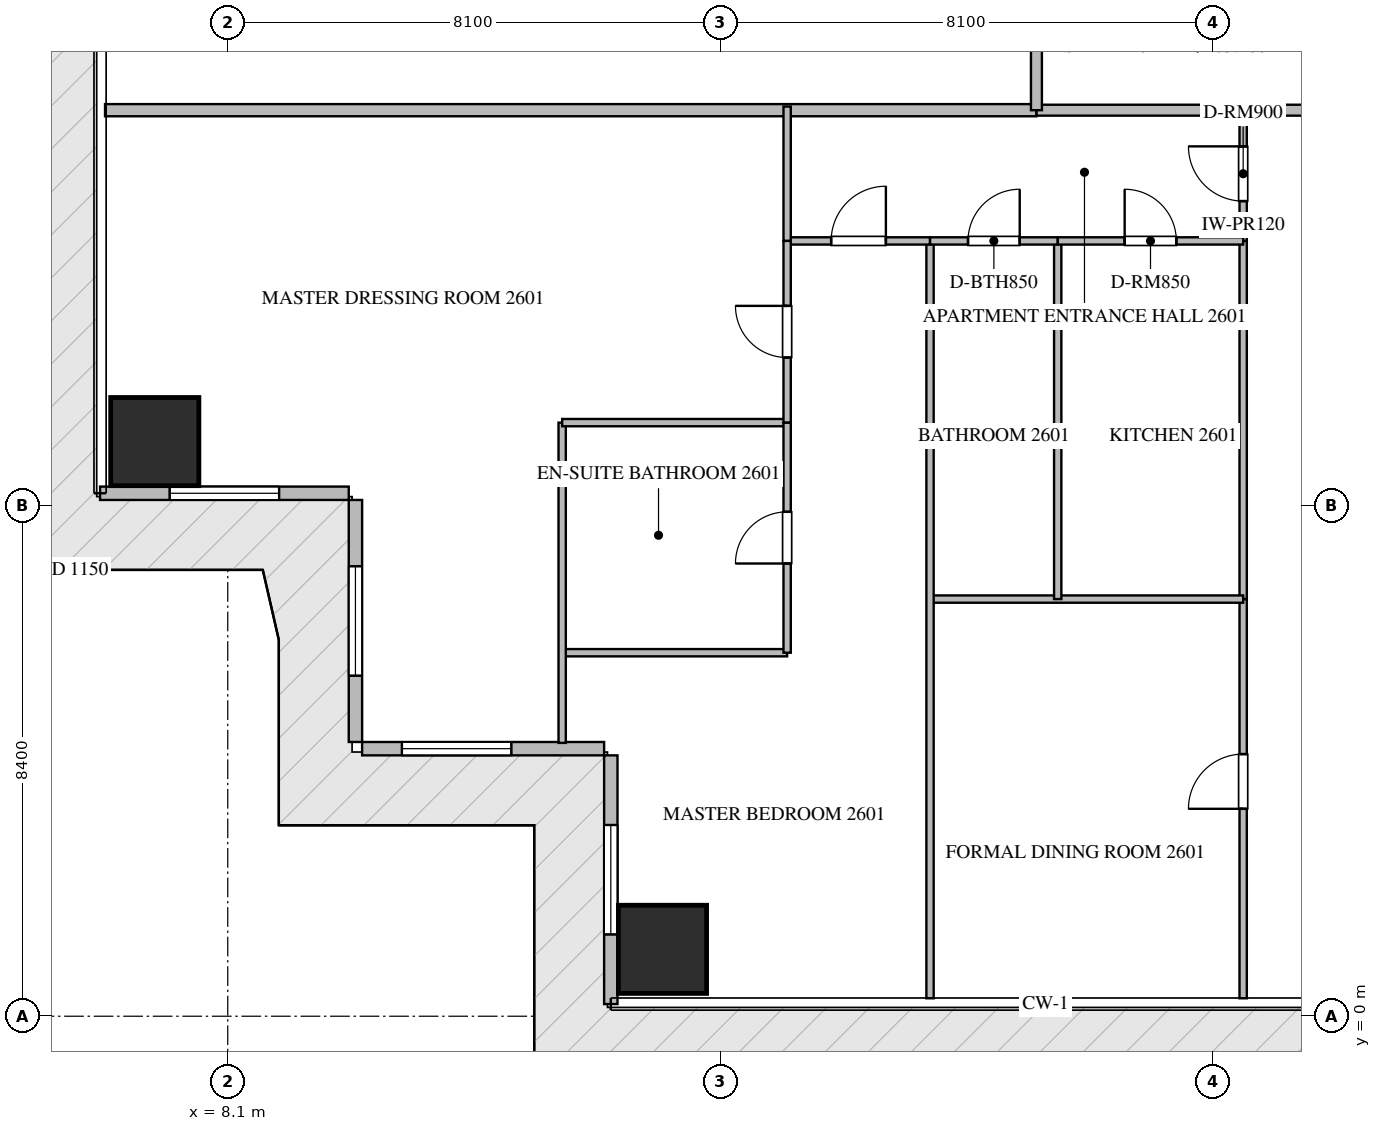
"""IFC4 building model, lengths in metres.
Left out: names, types, materials, properties, quantities, classifications, styles, units other than length and angle.
Written with IfcOpenShell. Run it as: python <this file> out.ifc"""

import sys

from ifc_helpers import new_model, si_unit, direction, frame, frame_2d, origin, origin_2d, place, context, subcontext, project, spatial, rectangle, extrude, source, transform, mapped, element, fill, save


model = new_model("IFC4")
c1 = context("Model", 3, precision=1e-05, world=origin(), true_north=direction((0.0, 1.0)))
c2 = subcontext(c1, "Body", "Model", "MODEL_VIEW")
j1 = project(units=[si_unit("LENGTHUNIT", "METRE"), si_unit("PLANEANGLEUNIT", "RADIAN")], contexts=[c1])
p1 = place(None, origin())
s1 = spatial("IfcSite", under=j1, at=p1, CompositionType="ELEMENT")
p2 = place(p1, origin())
s2 = spatial("IfcBuilding", under=s1, at=p2, CompositionType="ELEMENT")
p3 = place(p2, frame((0.0, 0.0, 105.45)))
s3 = spatial("IfcBuildingStorey", under=s2, at=p3, CompositionType="ELEMENT", Elevation=105.45)
m1 = source(origin(), c2, "Body", "SweptSolid", [
    extrude(rectangle(XDim=1.45, YDim=1.45, at=origin_2d()), origin(), (0.0, 0.0, 1.0), 3.65),
])
for number, where, z_axis, x_axis in (
    (1, (15.25, 1.1, -0.26), (0.0, 0.0, 1.0), (1.0, 0.0, 0.0)),
    (2, (6.9, 9.45, -0.26), (0.0, 0.0, 1.0), (1.0, 0.0, 0.0)),
):
    element("IfcColumn", number, at=place(p3, frame(where, z_axis=z_axis, x_axis=x_axis)), inside=s3, PredefinedType="COLUMN", context=c2, shape_type="MappedRepresentation", body=[
        mapped(m1, transform((0.0, 0.0, 0.0), scale=1.0)),
    ])
p4 = place(p3, frame((6.0, 8.6, 0.0), z_axis=(0.0, 0.0, 1.0), x_axis=(1.0, 0.0, 0.0)))
e3 = element("IfcWall", 3, at=p4, inside=s3, PredefinedType="ELEMENTEDWALL", context=c2, shape_type="SweptSolid", body=[
    extrude(rectangle(XDim=4.09, YDim=0.22, at=frame_2d((2.045, 0.0))), origin(), (0.0, 0.0, 1.0), 3.375),
])
p5 = place(p4, frame((1.145, 0.0, 0.65)))
e4 = element("IfcOpeningElement", 4, at=p5, cuts=e3, PredefinedType="OPENING", context=c2, shape_type="SweptSolid", body=[
    extrude(rectangle(XDim=1.8, YDim=2.1, at=frame_2d((0.9, 1.05))), frame((0.0, 0.12, 0.0), z_axis=(0.0, -1.0, 0.0), x_axis=(1.0, 0.0, 0.0)), (0.0, 0.0, 1.0), 0.24),
])
p6 = place(p3, frame((10.2, 8.49, 0.0), z_axis=(0.0, 0.0, 1.0), x_axis=(0.0, -1.0, 0.0)))
e5 = element("IfcWall", 5, at=p6, inside=s3, PredefinedType="ELEMENTEDWALL", context=c2, shape_type="SweptSolid", body=[
    extrude(rectangle(XDim=3.98, YDim=0.22, at=frame_2d((1.99, 0.0))), origin(), (0.0, 0.0, 1.0), 3.375),
])
p7 = place(p6, frame((1.09, 0.0, 0.65)))
e6 = element("IfcOpeningElement", 6, at=p7, cuts=e5, PredefinedType="OPENING", context=c2, shape_type="SweptSolid", body=[
    extrude(rectangle(XDim=1.8, YDim=2.1, at=frame_2d((0.9, 1.05))), frame((0.0, 0.12, 0.0), z_axis=(0.0, -1.0, 0.0), x_axis=(1.0, 0.0, 0.0)), (0.0, 0.0, 1.0), 0.24),
])
p8 = place(p3, frame((10.31, 4.4, 0.0), z_axis=(0.0, 0.0, 1.0), x_axis=(1.0, 0.0, 0.0)))
e7 = element("IfcWall", 7, at=p8, inside=s3, PredefinedType="ELEMENTEDWALL", context=c2, shape_type="SweptSolid", body=[
    extrude(rectangle(XDim=3.98, YDim=0.22, at=frame_2d((1.99, 0.0))), origin(), (0.0, 0.0, 1.0), 3.375),
])
p9 = place(p8, frame((0.654, 0.0, 0.65)))
e8 = element("IfcOpeningElement", 8, at=p9, cuts=e7, PredefinedType="OPENING", context=c2, shape_type="SweptSolid", body=[
    extrude(rectangle(XDim=1.8, YDim=2.1, at=frame_2d((0.9, 1.05))), frame((0.0, 0.12, 0.0), z_axis=(0.0, -1.0, 0.0), x_axis=(1.0, 0.0, 0.0)), (0.0, 0.0, 1.0), 0.24),
])
p10 = place(p3, frame((14.4, 4.29, 0.0), z_axis=(0.0, 0.0, 1.0), x_axis=(0.0, -1.0, 0.0)))
e9 = element("IfcWall", 9, at=p10, inside=s3, PredefinedType="ELEMENTEDWALL", context=c2, shape_type="SweptSolid", body=[
    extrude(rectangle(XDim=4.09, YDim=0.22, at=frame_2d((2.045, 0.0))), origin(), (0.0, 0.0, 1.0), 3.375),
])
p11 = place(p10, frame((1.145, 0.0, 0.65)))
e10 = element("IfcOpeningElement", 10, at=p11, cuts=e9, PredefinedType="OPENING", context=c2, shape_type="SweptSolid", body=[
    extrude(rectangle(XDim=1.8, YDim=2.1, at=frame_2d((0.9, 1.05))), frame((0.0, 0.12, 0.0), z_axis=(0.0, -1.0, 0.0), x_axis=(1.0, 0.0, 0.0)), (0.0, 0.0, 1.0), 0.24),
])
p12 = place(p3, frame((6.082, 14.9, 0.0), z_axis=(0.0, 0.0, 1.0), x_axis=(1.0, 0.0, 0.0)))
e11 = element("IfcWall", 11, at=p12, inside=s3, PredefinedType="PARTITIONING", context=c2, shape_type="SweptSolid", body=[
    extrude(rectangle(XDim=15.318, YDim=0.2, at=frame_2d((7.659, 0.0))), origin(), (0.0, 0.0, 1.0), 3.39),
])
p13 = place(p3, frame((21.402, 14.9, 0.0), z_axis=(0.0, 0.0, 1.0), x_axis=(1.0, 0.0, 0.0)))
e12 = element("IfcWall", 12, at=p13, inside=s3, PredefinedType="PARTITIONING", context=c2, shape_type="SweptSolid", body=[
    extrude(rectangle(XDim=21.996, YDim=0.18, at=frame_2d((10.998, 0.0))), origin(), (0.0, 0.0, 1.0), 3.39),
])
p14 = place(p13, frame((7.202, 0.0, 0.0)))
e13 = element("IfcOpeningElement", 13, at=p14, cuts=e12, PredefinedType="OPENING", context=c2, shape_type="SweptSolid", body=[
    extrude(rectangle(XDim=1.0, YDim=2.15, at=frame_2d((0.5, 1.075))), frame((0.0, 0.1, 0.0), z_axis=(0.0, -1.0, 0.0), x_axis=(1.0, 0.0, 0.0)), (0.0, 0.0, 1.0), 0.2),
])
p15 = place(p3, frame((21.4, 14.9, 0.0), z_axis=(0.0, 0.0, 1.0), x_axis=(0.0, 1.0, 0.0)))
e14 = element("IfcWall", 14, at=p15, inside=s3, PredefinedType="PARTITIONING", context=c2, shape_type="SweptSolid", body=[
    extrude(rectangle(XDim=20.6, YDim=0.18, at=frame_2d((10.3, 0.0))), origin(), (0.0, 0.0, 1.0), 3.39),
])
p16 = place(p15, frame((1.82, 0.0, 0.0)))
e15 = element("IfcOpeningElement", 15, at=p16, cuts=e14, PredefinedType="OPENING", context=c2, shape_type="SweptSolid", body=[
    extrude(rectangle(XDim=1.0, YDim=2.15, at=frame_2d((0.5, 1.075))), frame((0.0, 0.1, 0.0), z_axis=(0.0, -1.0, 0.0), x_axis=(1.0, 0.0, 0.0)), (0.0, 0.0, 1.0), 0.2),
])
p17 = place(p15, frame((11.27, 0.0, 0.0)))
e16 = element("IfcOpeningElement", 16, at=p17, cuts=e14, PredefinedType="OPENING", context=c2, shape_type="SweptSolid", body=[
    extrude(rectangle(XDim=1.0, YDim=2.15, at=frame_2d((0.5, 1.075))), frame((0.0, 0.1, 0.0), z_axis=(0.0, -1.0, 0.0), x_axis=(1.0, 0.0, 0.0)), (0.0, 0.0, 1.0), 0.2),
])
p18 = place(p15, frame((17.92, 0.0, 0.0)))
e17 = element("IfcOpeningElement", 17, at=p18, cuts=e14, PredefinedType="OPENING", context=c2, shape_type="SweptSolid", body=[
    extrude(rectangle(XDim=1.0, YDim=2.15, at=frame_2d((0.5, 1.075))), frame((0.0, 0.1, 0.0), z_axis=(0.0, -1.0, 0.0), x_axis=(1.0, 0.0, 0.0)), (0.0, 0.0, 1.0), 0.2),
])
p19 = place(p3, frame((24.8, 12.75, 0.0), z_axis=(0.0, 0.0, 1.0), x_axis=(0.0, 1.0, 0.0)))
e18 = element("IfcWall", 18, at=p19, inside=s3, PredefinedType="PARTITIONING", context=c2, shape_type="SweptSolid", body=[
    extrude(rectangle(XDim=2.21, YDim=0.12, at=frame_2d((1.105, 0.0))), origin(), (0.0, 0.0, 1.0), 3.39),
])
p20 = place(p19, frame((0.655, 0.0, 0.0)))
e19 = element("IfcOpeningElement", 19, at=p20, cuts=e18, PredefinedType="OPENING", context=c2, shape_type="SweptSolid", body=[
    extrude(rectangle(XDim=0.9, YDim=2.1, at=frame_2d((0.45, 1.05))), frame((0.0, 0.07, 0.0), z_axis=(0.0, -1.0, 0.0), x_axis=(1.0, 0.0, 0.0)), (0.0, 0.0, 1.0), 0.14),
])
p21 = place(p3, frame((24.8, 0.295, 0.0), z_axis=(0.0, 0.0, 1.0), x_axis=(0.0, 1.0, 0.0)))
e20 = element("IfcWall", 20, at=p21, inside=s3, PredefinedType="PARTITIONING", context=c2, shape_type="SweptSolid", body=[
    extrude(rectangle(XDim=6.565, YDim=0.12, at=frame_2d((3.283, 0.0))), origin(), (0.0, 0.0, 1.0), 3.39),
])
p22 = place(p21, frame((3.116, 0.0, 0.0)))
e21 = element("IfcOpeningElement", 21, at=p22, cuts=e20, PredefinedType="OPENING", context=c2, shape_type="SweptSolid", body=[
    extrude(rectangle(XDim=0.9, YDim=2.1, at=frame_2d((0.45, 1.05))), frame((0.0, 0.07, 0.0), z_axis=(0.0, -1.0, 0.0), x_axis=(1.0, 0.0, 0.0)), (0.0, 0.0, 1.0), 0.14),
])
p23 = place(p3, frame((24.8, 6.862, 0.0), z_axis=(0.0, 0.0, 1.0), x_axis=(0.0, 1.0, 0.0)))
e22 = element("IfcWall", 22, at=p23, inside=s3, PredefinedType="PARTITIONING", context=c2, shape_type="SweptSolid", body=[
    extrude(rectangle(XDim=5.886, YDim=0.12, at=frame_2d((2.943, 0.0))), origin(), (0.0, 0.0, 1.0), 3.39),
])
p24 = place(p3, frame((19.65, 6.86, 0.0), z_axis=(0.0, 0.0, 1.0), x_axis=(1.0, 0.0, 0.0)))
e23 = element("IfcWall", 23, at=p24, inside=s3, PredefinedType="PARTITIONING", context=c2, shape_type="SweptSolid", body=[
    extrude(rectangle(XDim=5.15, YDim=0.12, at=frame_2d((2.575, 0.0))), origin(), (0.0, 0.0, 1.0), 3.39),
])
p25 = place(p3, frame((19.65, 0.295, 0.0), z_axis=(0.0, 0.0, 1.0), x_axis=(0.0, 1.0, 0.0)))
e24 = element("IfcWall", 24, at=p25, inside=s3, PredefinedType="PARTITIONING", context=c2, shape_type="SweptSolid", body=[
    extrude(rectangle(XDim=12.455, YDim=0.12, at=frame_2d((6.228, 0.0))), origin(), (0.0, 0.0, 1.0), 3.39),
])
p26 = place(p3, frame((21.75, 6.86, 0.0), z_axis=(0.0, 0.0, 1.0), x_axis=(0.0, 1.0, 0.0)))
e25 = element("IfcWall", 25, at=p26, inside=s3, PredefinedType="PARTITIONING", context=c2, shape_type="SweptSolid", body=[
    extrude(rectangle(XDim=5.89, YDim=0.12, at=frame_2d((2.945, 0.0))), origin(), (0.0, 0.0, 1.0), 3.39),
])
p27 = place(p3, frame((19.65, 12.75, 0.0), z_axis=(0.0, 0.0, 1.0), x_axis=(1.0, 0.0, 0.0)))
e26 = element("IfcWall", 26, at=p27, inside=s3, PredefinedType="PARTITIONING", context=c2, shape_type="SweptSolid", body=[
    extrude(rectangle(XDim=2.1, YDim=0.12, at=frame_2d((1.05, 0.0))), origin(), (0.0, 0.0, 1.0), 3.39),
])
p28 = place(p27, frame((0.625, 0.0, 0.0)))
e27 = element("IfcOpeningElement", 27, at=p28, cuts=e26, PredefinedType="OPENING", context=c2, shape_type="SweptSolid", body=[
    extrude(rectangle(XDim=0.85, YDim=2.1, at=frame_2d((0.425, 1.05))), frame((0.0, 0.07, 0.0), z_axis=(0.0, -1.0, 0.0), x_axis=(1.0, 0.0, 0.0)), (0.0, 0.0, 1.0), 0.14),
])
p29 = place(p3, frame((21.752, 12.75, 0.0), z_axis=(0.0, 0.0, 1.0), x_axis=(1.0, 0.0, 0.0)))
e28 = element("IfcWall", 28, at=p29, inside=s3, PredefinedType="PARTITIONING", context=c2, shape_type="SweptSolid", body=[
    extrude(rectangle(XDim=3.048, YDim=0.12, at=frame_2d((1.524, 0.0))), origin(), (0.0, 0.0, 1.0), 3.39),
])
p30 = place(p29, frame((1.099, 0.0, 0.0)))
e29 = element("IfcOpeningElement", 29, at=p30, cuts=e28, PredefinedType="OPENING", context=c2, shape_type="SweptSolid", body=[
    extrude(rectangle(XDim=0.85, YDim=2.1, at=frame_2d((0.425, 1.05))), frame((0.0, 0.07, 0.0), z_axis=(0.0, -1.0, 0.0), x_axis=(1.0, 0.0, 0.0)), (0.0, 0.0, 1.0), 0.14),
])
p31 = place(p3, frame((17.3, 12.75, 0.0), z_axis=(0.0, 0.0, 1.0), x_axis=(1.0, 0.0, 0.0)))
e30 = element("IfcWall", 30, at=p31, inside=s3, PredefinedType="PARTITIONING", context=c2, shape_type="SweptSolid", body=[
    extrude(rectangle(XDim=2.348, YDim=0.12, at=frame_2d((1.174, 0.0))), origin(), (0.0, 0.0, 1.0), 3.39),
])
p32 = place(p31, frame((0.724, 0.0, 0.0)))
e31 = element("IfcOpeningElement", 31, at=p32, cuts=e30, PredefinedType="OPENING", context=c2, shape_type="SweptSolid", body=[
    extrude(rectangle(XDim=0.9, YDim=2.1, at=frame_2d((0.45, 1.05))), frame((0.0, 0.07, 0.0), z_axis=(0.0, -1.0, 0.0), x_axis=(1.0, 0.0, 0.0)), (0.0, 0.0, 1.0), 0.14),
])
p33 = place(p3, frame((13.6, 5.978, 0.0), z_axis=(0.0, 0.0, 1.0), x_axis=(1.0, 0.0, 0.0)))
e32 = element("IfcWall", 32, at=p33, inside=s3, PredefinedType="PARTITIONING", context=c2, shape_type="SweptSolid", body=[
    extrude(rectangle(XDim=3.7, YDim=0.12, at=frame_2d((1.85, 0.0))), origin(), (0.0, 0.0, 1.0), 3.39),
])
p34 = place(p3, frame((13.6, 4.495, 0.0), z_axis=(0.0, 0.0, 1.0), x_axis=(0.0, 1.0, 0.0)))
e33 = element("IfcWall", 33, at=p34, inside=s3, PredefinedType="PARTITIONING", context=c2, shape_type="SweptSolid", body=[
    extrude(rectangle(XDim=5.267, YDim=0.12, at=frame_2d((2.633, 0.0))), origin(), (0.0, 0.0, 1.0), 3.39),
])
p35 = place(p3, frame((13.6, 9.762, 0.0), z_axis=(0.0, 0.0, 1.0), x_axis=(1.0, 0.0, 0.0)))
e34 = element("IfcWall", 34, at=p35, inside=s3, PredefinedType="PARTITIONING", context=c2, shape_type="SweptSolid", body=[
    extrude(rectangle(XDim=3.7, YDim=0.12, at=frame_2d((1.85, 0.0))), origin(), (0.0, 0.0, 1.0), 3.39),
])
p36 = place(p3, frame((17.3, 5.978, 0.0), z_axis=(0.0, 0.0, 1.0), x_axis=(0.0, 1.0, 0.0)))
e35 = element("IfcWall", 35, at=p36, inside=s3, PredefinedType="PARTITIONING", context=c2, shape_type="SweptSolid", body=[
    extrude(rectangle(XDim=3.784, YDim=0.12, at=frame_2d((1.892, 0.0))), origin(), (0.0, 0.0, 1.0), 3.39),
])
p37 = place(p36, frame((1.467, 0.0, 0.0)))
e36 = element("IfcOpeningElement", 36, at=p37, cuts=e35, PredefinedType="OPENING", context=c2, shape_type="SweptSolid", body=[
    extrude(rectangle(XDim=0.85, YDim=2.1, at=frame_2d((0.425, 1.05))), frame((0.0, 0.07, 0.0), z_axis=(0.0, -1.0, 0.0), x_axis=(1.0, 0.0, 0.0)), (0.0, 0.0, 1.0), 0.14),
])
p38 = place(p3, frame((17.3, 9.764, 0.0), z_axis=(0.0, 0.0, 1.0), x_axis=(0.0, 1.0, 0.0)))
e37 = element("IfcWall", 37, at=p38, inside=s3, PredefinedType="PARTITIONING", context=c2, shape_type="SweptSolid", body=[
    extrude(rectangle(XDim=2.986, YDim=0.12, at=frame_2d((1.493, 0.0))), origin(), (0.0, 0.0, 1.0), 3.39),
])
p39 = place(p38, frame((1.068, 0.0, 0.0)))
e38 = element("IfcOpeningElement", 38, at=p39, cuts=e37, PredefinedType="OPENING", context=c2, shape_type="SweptSolid", body=[
    extrude(rectangle(XDim=0.85, YDim=2.1, at=frame_2d((0.425, 1.05))), frame((0.0, 0.07, 0.0), z_axis=(0.0, -1.0, 0.0), x_axis=(1.0, 0.0, 0.0)), (0.0, 0.0, 1.0), 0.14),
])
p40 = place(p3, frame((17.3, 12.752, 0.0), z_axis=(0.0, 0.0, 1.0), x_axis=(0.0, 1.0, 0.0)))
e39 = element("IfcWall", 39, at=p40, inside=s3, PredefinedType="PARTITIONING", context=c2, shape_type="SweptSolid", body=[
    extrude(rectangle(XDim=2.208, YDim=0.12, at=frame_2d((1.104, 0.0))), origin(), (0.0, 0.0, 1.0), 3.39),
])
m2 = source(origin(), c2, "Body", "SweptSolid", [
    extrude(rectangle(XDim=1.8, YDim=2.1, at=frame_2d((0.9, 1.05))), frame((0.0, 0.03, 0.0), z_axis=(0.0, -1.0, 0.0), x_axis=(1.0, 0.0, 0.0)), (0.0, 0.0, 1.0), 0.06),
])
p41 = place(p5, origin())
e40 = element("IfcWindow", 40, at=p41, inside=s3, PartitioningType="SINGLE_PANEL", PredefinedType="WINDOW", context=c2, shape_type="MappedRepresentation", body=[
    mapped(m2, transform((0.0, 0.0, 0.0), scale=1.0)),
])
fill(e4, e40)
p42 = place(p7, origin())
e41 = element("IfcWindow", 41, at=p42, inside=s3, PartitioningType="SINGLE_PANEL", PredefinedType="WINDOW", context=c2, shape_type="MappedRepresentation", body=[
    mapped(m2, transform((0.0, 0.0, 0.0), scale=1.0)),
])
fill(e6, e41)
p43 = place(p9, origin())
e42 = element("IfcWindow", 42, at=p43, inside=s3, PartitioningType="SINGLE_PANEL", PredefinedType="WINDOW", context=c2, shape_type="MappedRepresentation", body=[
    mapped(m2, transform((0.0, 0.0, 0.0), scale=1.0)),
])
fill(e8, e42)
p44 = place(p11, origin())
e43 = element("IfcWindow", 43, at=p44, inside=s3, PartitioningType="SINGLE_PANEL", PredefinedType="WINDOW", context=c2, shape_type="MappedRepresentation", body=[
    mapped(m2, transform((0.0, 0.0, 0.0), scale=1.0)),
])
fill(e10, e43)
m3 = source(origin(), c2, "Body", "SweptSolid", [
    extrude(rectangle(XDim=0.9, YDim=2.1, at=frame_2d((0.45, 1.05))), frame((0.0, 0.025, 0.0), z_axis=(0.0, -1.0, 0.0), x_axis=(1.0, 0.0, 0.0)), (0.0, 0.0, 1.0), 0.05),
])
p45 = place(p20, origin())
e44 = element("IfcDoor", 44, at=p45, inside=s3, OperationType="SINGLE_SWING_RIGHT", PredefinedType="DOOR", context=c2, shape_type="MappedRepresentation", body=[
    mapped(m3, transform((0.0, 0.0, 0.0), scale=1.0)),
])
fill(e19, e44)
p46 = place(p22, origin())
e45 = element("IfcDoor", 45, at=p46, inside=s3, OperationType="SINGLE_SWING_LEFT", PredefinedType="DOOR", context=c2, shape_type="MappedRepresentation", body=[
    mapped(m3, transform((0.0, 0.0, 0.0), scale=1.0)),
])
fill(e21, e45)
m4 = source(origin(), c2, "Body", "SweptSolid", [
    extrude(rectangle(XDim=0.85, YDim=2.1, at=frame_2d((0.425, 1.05))), frame((0.0, 0.025, 0.0), z_axis=(0.0, -1.0, 0.0), x_axis=(1.0, 0.0, 0.0)), (0.0, 0.0, 1.0), 0.05),
])
p47 = place(p28, origin())
e46 = element("IfcDoor", 46, at=p47, inside=s3, OperationType="SINGLE_SWING_RIGHT", PredefinedType="DOOR", context=c2, shape_type="MappedRepresentation", body=[
    mapped(m4, transform((0.0, 0.0, 0.0), scale=1.0)),
])
fill(e27, e46)
p48 = place(p30, origin())
e47 = element("IfcDoor", 47, at=p48, inside=s3, OperationType="SINGLE_SWING_LEFT", PredefinedType="DOOR", context=c2, shape_type="MappedRepresentation", body=[
    mapped(m4, transform((0.0, 0.0, 0.0), scale=1.0)),
])
fill(e29, e47)
p49 = place(p32, origin())
e48 = element("IfcDoor", 48, at=p49, inside=s3, OperationType="SINGLE_SWING_RIGHT", PredefinedType="DOOR", context=c2, shape_type="MappedRepresentation", body=[
    mapped(m3, transform((0.0, 0.0, 0.0), scale=1.0)),
])
fill(e31, e48)
p50 = place(p37, origin())
e49 = element("IfcDoor", 49, at=p50, inside=s3, OperationType="SINGLE_SWING_LEFT", PredefinedType="DOOR", context=c2, shape_type="MappedRepresentation", body=[
    mapped(m4, transform((0.0, 0.0, 0.0), scale=1.0)),
])
fill(e36, e49)
p51 = place(p39, origin())
e50 = element("IfcDoor", 50, at=p51, inside=s3, OperationType="SINGLE_SWING_RIGHT", PredefinedType="DOOR", context=c2, shape_type="MappedRepresentation", body=[
    mapped(m4, transform((0.0, 0.0, 0.0), scale=1.0)),
])
fill(e38, e50)
save(model, sys.argv[1])
